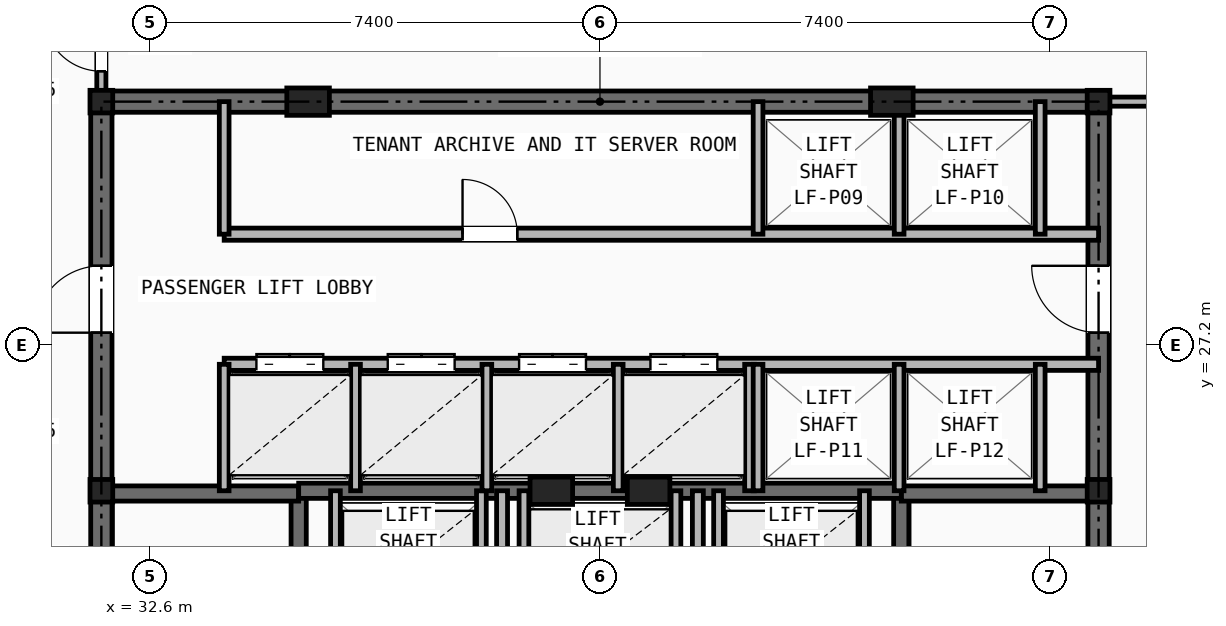
"""IFC4 building model, lengths in metres.
Left out: names, types, materials, properties, quantities, classifications, styles, units other than length and angle.
Written with IfcOpenShell. Run it as: python <this file> out.ifc"""

import sys

from ifc_helpers import new_model, si_unit, direction, frame, frame_2d, origin, origin_2d, place, context, subcontext, project, spatial, rectangle, i_section, extrude, element, fill, save


model = new_model("IFC4")
c1 = context("Model", 3, precision=1e-05, world=origin(), true_north=direction((0.0, 1.0)))
c2 = subcontext(c1, "Body", "Model", "MODEL_VIEW")
j1 = project(units=[si_unit("LENGTHUNIT", "METRE"), si_unit("PLANEANGLEUNIT", "RADIAN")], contexts=[c1])
p1 = place(None, origin())
s1 = spatial("IfcSite", under=j1, at=p1, CompositionType="ELEMENT")
p2 = place(p1, origin())
s2 = spatial("IfcBuilding", under=s1, at=p2, CompositionType="ELEMENT")
p3 = place(p2, frame((0.0, 0.0, 126.35)))
s3 = spatial("IfcBuildingStorey", under=s2, at=p3, CompositionType="ELEMENT", Elevation=126.35)
for number, where, z_axis, x_axis in (
    (1, (31.8, 24.8, 0.0), (0.0, 0.0, 1.0), (1.0, 0.0, 0.0)),
    (2, (48.2, 24.8, 0.0), (0.0, 0.0, 1.0), (1.0, 0.0, 0.0)),
    (3, (31.8, 31.2, 0.0), (0.0, 0.0, 1.0), (1.0, 0.0, 0.0)),
    (4, (48.2, 31.2, 0.0), (0.0, 0.0, 1.0), (1.0, 0.0, 0.0)),
):
    element("IfcColumn", number, at=place(p3, frame(where, z_axis=z_axis, x_axis=x_axis)), inside=s3, PredefinedType="COLUMN", context=c2, shape_type="SweptSolid", body=[
        extrude(i_section(OverallWidth=0.374, OverallDepth=0.372, WebThickness=0.016, FlangeThickness=0.026, at=origin_2d()), origin(), (0.0, 0.0, 1.0), 3.45),
    ])
for number, where, z_axis, x_axis in (
    (5, (35.2, 31.2, 0.0), (0.0, 0.0, 1.0), (1.0, 0.0, 0.0)),
    (6, (44.8, 31.2, 0.0), (0.0, 0.0, 1.0), (1.0, 0.0, 0.0)),
    (7, (39.2, 24.8, 0.0), (0.0, 0.0, 1.0), (1.0, 0.0, 0.0)),
    (8, (40.8, 24.8, 0.0), (0.0, 0.0, 1.0), (1.0, 0.0, 0.0)),
):
    element("IfcColumn", number, at=place(p3, frame(where, z_axis=z_axis, x_axis=x_axis)), inside=s3, PredefinedType="PILASTER", context=c2, shape_type="SweptSolid", body=[
        extrude(rectangle(XDim=0.7, YDim=0.45, at=origin_2d()), origin(), (0.0, 0.0, 1.0), 3.45),
    ])
p4 = place(p3, frame((31.8, 31.2, 0.0), z_axis=(0.0, 0.0, 1.0), x_axis=(1.0, 0.0, 0.0)))
e9 = element("IfcWall", 9, at=p4, inside=s3, PredefinedType="SHEAR", context=c2, shape_type="SweptSolid", body=[
    extrude(rectangle(XDim=16.4, YDim=0.35, at=frame_2d((8.2, 0.0))), origin(), (0.0, 0.0, 1.0), 3.21),
])
p5 = place(p3, frame((31.8, 16.4, 0.0), z_axis=(0.0, 0.0, 1.0), x_axis=(0.0, 1.0, 0.0)))
e10 = element("IfcWall", 10, at=p5, inside=s3, PredefinedType="SHEAR", context=c2, shape_type="SweptSolid", body=[
    extrude(rectangle(XDim=14.8, YDim=0.35, at=frame_2d((7.4, 0.0))), origin(), (0.0, 0.0, 1.0), 3.21),
])
p6 = place(p5, frame((11.0, 0.0, 0.0)))
e11 = element("IfcOpeningElement", 11, at=p6, cuts=e10, PredefinedType="OPENING", context=c2, shape_type="SweptSolid", body=[
    extrude(rectangle(XDim=1.1, YDim=2.15, at=frame_2d((0.55, 1.075))), frame((0.0, 0.185, 0.0), z_axis=(0.0, -1.0, 0.0), x_axis=(1.0, 0.0, 0.0)), (0.0, 0.0, 1.0), 0.37),
])
p7 = place(p3, frame((48.2, 16.4, 0.0), z_axis=(0.0, 0.0, 1.0), x_axis=(0.0, 1.0, 0.0)))
e12 = element("IfcWall", 12, at=p7, inside=s3, PredefinedType="SHEAR", context=c2, shape_type="SweptSolid", body=[
    extrude(rectangle(XDim=14.8, YDim=0.35, at=frame_2d((7.4, 0.0))), origin(), (0.0, 0.0, 1.0), 3.21),
])
p8 = place(p7, frame((11.0, 0.0, 0.0)))
e13 = element("IfcOpeningElement", 13, at=p8, cuts=e12, PredefinedType="OPENING", context=c2, shape_type="SweptSolid", body=[
    extrude(rectangle(XDim=1.1, YDim=2.15, at=frame_2d((0.55, 1.075))), frame((0.0, 0.185, 0.0), z_axis=(0.0, -1.0, 0.0), x_axis=(1.0, 0.0, 0.0)), (0.0, 0.0, 1.0), 0.37),
])
p9 = place(p3, frame((35.045, 16.4, 0.0), z_axis=(0.0, 0.0, 1.0), x_axis=(0.0, 1.0, 0.0)))
e14 = element("IfcWall", 14, at=p9, inside=s3, PredefinedType="SHEAR", context=c2, shape_type="SweptSolid", body=[
    extrude(rectangle(XDim=8.4, YDim=0.25, at=frame_2d((4.2, 0.0))), origin(), (0.0, 0.0, 1.0), 3.21),
])
p10 = place(p9, frame((0.45, 0.0, 0.0)))
e15 = element("IfcOpeningElement", 15, at=p10, cuts=e14, PredefinedType="OPENING", context=c2, shape_type="SweptSolid", body=[
    extrude(rectangle(XDim=0.95, YDim=2.1, at=frame_2d((0.475, 1.05))), frame((0.0, 0.135, 0.0), z_axis=(0.0, -1.0, 0.0), x_axis=(1.0, 0.0, 0.0)), (0.0, 0.0, 1.0), 0.27),
])
p11 = place(p3, frame((31.8, 24.755, 0.0), z_axis=(0.0, 0.0, 1.0), x_axis=(1.0, 0.0, 0.0)))
e16 = element("IfcWall", 16, at=p11, inside=s3, PredefinedType="SHEAR", context=c2, shape_type="SweptSolid", body=[
    extrude(rectangle(XDim=3.245, YDim=0.25, at=frame_2d((1.623, 0.0))), origin(), (0.0, 0.0, 1.0), 3.21),
])
p12 = place(p3, frame((44.955, 16.4, 0.0), z_axis=(0.0, 0.0, 1.0), x_axis=(0.0, 1.0, 0.0)))
e17 = element("IfcWall", 17, at=p12, inside=s3, PredefinedType="SHEAR", context=c2, shape_type="SweptSolid", body=[
    extrude(rectangle(XDim=8.4, YDim=0.25, at=frame_2d((4.2, 0.0))), origin(), (0.0, 0.0, 1.0), 3.21),
])
p13 = place(p12, frame((0.45, 0.0, 0.0)))
e18 = element("IfcOpeningElement", 18, at=p13, cuts=e17, PredefinedType="OPENING", context=c2, shape_type="SweptSolid", body=[
    extrude(rectangle(XDim=0.95, YDim=2.1, at=frame_2d((0.475, 1.05))), frame((0.0, 0.135, 0.0), z_axis=(0.0, -1.0, 0.0), x_axis=(1.0, 0.0, 0.0)), (0.0, 0.0, 1.0), 0.27),
])
p14 = place(p3, frame((44.955, 24.755, 0.0), z_axis=(0.0, 0.0, 1.0), x_axis=(1.0, 0.0, 0.0)))
e19 = element("IfcWall", 19, at=p14, inside=s3, PredefinedType="SHEAR", context=c2, shape_type="SweptSolid", body=[
    extrude(rectangle(XDim=3.245, YDim=0.25, at=frame_2d((1.623, 0.0))), origin(), (0.0, 0.0, 1.0), 3.21),
])
p15 = place(p3, frame((35.045, 24.8, 0.0), z_axis=(0.0, 0.0, 1.0), x_axis=(1.0, 0.0, 0.0)))
e20 = element("IfcWall", 20, at=p15, inside=s3, PredefinedType="SHEAR", context=c2, shape_type="SweptSolid", body=[
    extrude(rectangle(XDim=9.91, YDim=0.25, at=frame_2d((4.955, 0.0))), origin(), (0.0, 0.0, 1.0), 3.21),
])
p16 = place(p3, frame((38.39, 16.4, 0.0), z_axis=(0.0, 0.0, 1.0), x_axis=(0.0, 1.0, 0.0)))
e21 = element("IfcWall", 21, at=p16, inside=s3, PredefinedType="PARTITIONING", context=c2, shape_type="SweptSolid", body=[
    extrude(rectangle(XDim=8.4, YDim=0.18, at=frame_2d((4.2, 0.0))), origin(), (0.0, 0.0, 1.0), 2.661),
])
p17 = place(p16, frame((1.8, 0.0, 0.0)))
e22 = element("IfcOpeningElement", 22, at=p17, cuts=e21, PredefinedType="OPENING", context=c2, shape_type="SweptSolid", body=[
    extrude(rectangle(XDim=0.85, YDim=2.05, at=frame_2d((0.425, 1.025))), frame((0.0, 0.1, 0.0), z_axis=(0.0, -1.0, 0.0), x_axis=(1.0, 0.0, 0.0)), (0.0, 0.0, 1.0), 0.2),
])
p18 = place(p16, frame((4.35, 0.0, 0.0)))
e23 = element("IfcOpeningElement", 23, at=p18, cuts=e21, PredefinedType="OPENING", context=c2, shape_type="SweptSolid", body=[
    extrude(rectangle(XDim=0.95, YDim=2.1, at=frame_2d((0.475, 1.05))), frame((0.0, 0.1, 0.0), z_axis=(0.0, -1.0, 0.0), x_axis=(1.0, 0.0, 0.0)), (0.0, 0.0, 1.0), 0.2),
])
p19 = place(p3, frame((41.61, 16.4, 0.0), z_axis=(0.0, 0.0, 1.0), x_axis=(0.0, 1.0, 0.0)))
e24 = element("IfcWall", 24, at=p19, inside=s3, PredefinedType="PARTITIONING", context=c2, shape_type="SweptSolid", body=[
    extrude(rectangle(XDim=8.4, YDim=0.18, at=frame_2d((4.2, 0.0))), origin(), (0.0, 0.0, 1.0), 2.661),
])
p20 = place(p19, frame((1.8, 0.0, 0.0)))
e25 = element("IfcOpeningElement", 25, at=p20, cuts=e24, PredefinedType="OPENING", context=c2, shape_type="SweptSolid", body=[
    extrude(rectangle(XDim=0.85, YDim=2.05, at=frame_2d((0.425, 1.025))), frame((0.0, 0.1, 0.0), z_axis=(0.0, -1.0, 0.0), x_axis=(1.0, 0.0, 0.0)), (0.0, 0.0, 1.0), 0.2),
])
for number, where, z_axis, x_axis in (
    (26, (35.65, 22.48, 0.0), (0.0, 0.0, 1.0), (0.0, 1.0, 0.0)),
    (27, (38.05, 22.48, 0.0), (0.0, 0.0, 1.0), (0.0, 1.0, 0.0)),
    (28, (41.95, 22.48, 0.0), (0.0, 0.0, 1.0), (0.0, 1.0, 0.0)),
    (29, (44.35, 22.48, 0.0), (0.0, 0.0, 1.0), (0.0, 1.0, 0.0)),
    (30, (38.75, 22.48, 0.0), (0.0, 0.0, 1.0), (0.0, 1.0, 0.0)),
    (31, (41.25, 22.48, 0.0), (0.0, 0.0, 1.0), (0.0, 1.0, 0.0)),
):
    element("IfcWall", number, at=place(p3, frame(where, z_axis=z_axis, x_axis=x_axis)), inside=s3, PredefinedType="SOLIDWALL", context=c2, shape_type="SweptSolid", body=[
        extrude(rectangle(XDim=2.32, YDim=0.16, at=frame_2d((1.16, 0.0))), origin(), (0.0, 0.0, 1.0), 3.21),
    ])
p21 = place(p3, frame((33.82, 29.02, 0.0), z_axis=(0.0, 0.0, 1.0), x_axis=(1.0, 0.0, 0.0)))
e32 = element("IfcWall", 32, at=p21, inside=s3, PredefinedType="SOLIDWALL", context=c2, shape_type="SweptSolid", body=[
    extrude(rectangle(XDim=14.38, YDim=0.2, at=frame_2d((7.19, 0.0))), origin(), (0.0, 0.0, 1.0), 2.661),
])
p22 = place(p21, frame((3.92, 0.0, 0.0)))
e33 = element("IfcOpeningElement", 33, at=p22, cuts=e32, PredefinedType="OPENING", context=c2, shape_type="SweptSolid", body=[
    extrude(rectangle(XDim=0.9, YDim=2.1, at=frame_2d((0.45, 1.05))), frame((0.0, 0.11, 0.0), z_axis=(0.0, -1.0, 0.0), x_axis=(1.0, 0.0, 0.0)), (0.0, 0.0, 1.0), 0.22),
])
p23 = place(p3, frame((33.82, 26.88, 0.0), z_axis=(0.0, 0.0, 1.0), x_axis=(1.0, 0.0, 0.0)))
e34 = element("IfcWall", 34, at=p23, inside=s3, PredefinedType="SOLIDWALL", context=c2, shape_type="SweptSolid", body=[
    extrude(rectangle(XDim=14.38, YDim=0.2, at=frame_2d((7.19, 0.0))), origin(), (0.0, 0.0, 1.0), 2.661),
])
p24 = place(p23, frame((0.53, 0.0, 0.0)))
e35 = element("IfcOpeningElement", 35, at=p24, cuts=e34, PredefinedType="OPENING", context=c2, shape_type="SweptSolid", body=[
    extrude(rectangle(XDim=1.1, YDim=2.15, at=frame_2d((0.55, 1.075))), frame((0.0, 0.11, 0.0), z_axis=(0.0, -1.0, 0.0), x_axis=(1.0, 0.0, 0.0)), (0.0, 0.0, 1.0), 0.22),
])
p25 = place(p23, frame((2.69, 0.0, 0.0)))
e36 = element("IfcOpeningElement", 36, at=p25, cuts=e34, PredefinedType="OPENING", context=c2, shape_type="SweptSolid", body=[
    extrude(rectangle(XDim=1.1, YDim=2.15, at=frame_2d((0.55, 1.075))), frame((0.0, 0.11, 0.0), z_axis=(0.0, -1.0, 0.0), x_axis=(1.0, 0.0, 0.0)), (0.0, 0.0, 1.0), 0.22),
])
p26 = place(p23, frame((4.85, 0.0, 0.0)))
e37 = element("IfcOpeningElement", 37, at=p26, cuts=e34, PredefinedType="OPENING", context=c2, shape_type="SweptSolid", body=[
    extrude(rectangle(XDim=1.1, YDim=2.15, at=frame_2d((0.55, 1.075))), frame((0.0, 0.11, 0.0), z_axis=(0.0, -1.0, 0.0), x_axis=(1.0, 0.0, 0.0)), (0.0, 0.0, 1.0), 0.22),
])
p27 = place(p23, frame((7.01, 0.0, 0.0)))
e38 = element("IfcOpeningElement", 38, at=p27, cuts=e34, PredefinedType="OPENING", context=c2, shape_type="SweptSolid", body=[
    extrude(rectangle(XDim=1.1, YDim=2.15, at=frame_2d((0.55, 1.075))), frame((0.0, 0.11, 0.0), z_axis=(0.0, -1.0, 0.0), x_axis=(1.0, 0.0, 0.0)), (0.0, 0.0, 1.0), 0.22),
])
p28 = place(p3, frame((33.82, 29.02, 0.0), z_axis=(0.0, 0.0, 1.0), x_axis=(0.0, 1.0, 0.0)))
e39 = element("IfcWall", 39, at=p28, inside=s3, PredefinedType="SOLIDWALL", context=c2, shape_type="SweptSolid", body=[
    extrude(rectangle(XDim=2.18, YDim=0.16, at=frame_2d((1.09, 0.0))), origin(), (0.0, 0.0, 1.0), 2.661),
])
for number, where, z_axis, x_axis in (
    (40, (33.82, 24.8, 0.0), (0.0, 0.0, 1.0), (0.0, 1.0, 0.0)),
    (41, (35.98, 24.8, 0.0), (0.0, 0.0, 1.0), (0.0, 1.0, 0.0)),
    (42, (38.14, 24.8, 0.0), (0.0, 0.0, 1.0), (0.0, 1.0, 0.0)),
    (43, (40.3, 24.8, 0.0), (0.0, 0.0, 1.0), (0.0, 1.0, 0.0)),
    (44, (42.46, 24.8, 0.0), (0.0, 0.0, 1.0), (0.0, 1.0, 0.0)),
):
    element("IfcWall", number, at=place(p3, frame(where, z_axis=z_axis, x_axis=x_axis)), inside=s3, PredefinedType="SOLIDWALL", context=c2, shape_type="SweptSolid", body=[
        extrude(rectangle(XDim=2.08, YDim=0.16, at=frame_2d((1.04, 0.0))), origin(), (0.0, 0.0, 1.0), 3.21),
    ])
for number, where, z_axis, x_axis in (
    (45, (42.6, 29.02, 0.0), (0.0, 0.0, 1.0), (0.0, 1.0, 0.0)),
    (46, (44.92, 29.02, 0.0), (0.0, 0.0, 1.0), (0.0, 1.0, 0.0)),
    (47, (47.24, 29.02, 0.0), (0.0, 0.0, 1.0), (0.0, 1.0, 0.0)),
):
    element("IfcWall", number, at=place(p3, frame(where, z_axis=z_axis, x_axis=x_axis)), inside=s3, PredefinedType="SOLIDWALL", context=c2, shape_type="SweptSolid", body=[
        extrude(rectangle(XDim=2.18, YDim=0.16, at=frame_2d((1.09, 0.0))), origin(), (0.0, 0.0, 1.0), 2.661),
    ])
for number, where, z_axis, x_axis in (
    (48, (42.6, 24.8, 0.0), (0.0, 0.0, 1.0), (0.0, 1.0, 0.0)),
    (49, (44.92, 24.8, 0.0), (0.0, 0.0, 1.0), (0.0, 1.0, 0.0)),
    (50, (47.24, 24.8, 0.0), (0.0, 0.0, 1.0), (0.0, 1.0, 0.0)),
):
    element("IfcWall", number, at=place(p3, frame(where, z_axis=z_axis, x_axis=x_axis)), inside=s3, PredefinedType="SOLIDWALL", context=c2, shape_type="SweptSolid", body=[
        extrude(rectangle(XDim=2.08, YDim=0.16, at=frame_2d((1.04, 0.0))), origin(), (0.0, 0.0, 1.0), 3.21),
    ])
p29 = place(p3, frame((31.8, 31.2, 0.0), z_axis=(0.0, 0.0, 1.0), x_axis=(0.0, 1.0, 0.0)))
e51 = element("IfcWall", 51, at=p29, inside=s3, PredefinedType="PARTITIONING", context=c2, shape_type="SweptSolid", body=[
    extrude(rectangle(XDim=5.3, YDim=0.15, at=frame_2d((2.65, 0.0))), origin(), (0.0, 0.0, 1.0), 2.225),
])
p30 = place(p29, frame((0.5, 0.0, 0.0)))
e52 = element("IfcOpeningElement", 52, at=p30, cuts=e51, PredefinedType="OPENING", context=c2, shape_type="SweptSolid", body=[
    extrude(rectangle(XDim=0.95, YDim=2.1, at=frame_2d((0.475, 1.05))), frame((0.0, 0.085, 0.0), z_axis=(0.0, -1.0, 0.0), x_axis=(1.0, 0.0, 0.0)), (0.0, 0.0, 1.0), 0.17),
])
p31 = place(p29, frame((4.23, 0.0, 0.0)))
e53 = element("IfcOpeningElement", 53, at=p31, cuts=e51, PredefinedType="OPENING", context=c2, shape_type="SweptSolid", body=[
    extrude(rectangle(XDim=0.95, YDim=2.1, at=frame_2d((0.475, 1.05))), frame((0.0, 0.085, 0.0), z_axis=(0.0, -1.0, 0.0), x_axis=(1.0, 0.0, 0.0)), (0.0, 0.0, 1.0), 0.17),
])
p32 = place(p3, frame((48.2, 31.2, 0.0), z_axis=(0.0, 0.0, 1.0), x_axis=(1.0, 0.0, 0.0)))
e54 = element("IfcWall", 54, at=p32, inside=s3, PredefinedType="PARTITIONING", context=c2, shape_type="SweptSolid", body=[
    extrude(rectangle(XDim=8.972, YDim=0.15, at=frame_2d((4.486, 0.0))), origin(), (0.0, 0.0, 1.0), 2.225),
])
p33 = place(p6, origin())
e55 = element("IfcDoor", 55, at=p33, inside=s3, OperationType="SINGLE_SWING_LEFT", PredefinedType="DOOR", context=c2, shape_type="SweptSolid", body=[
    extrude(rectangle(XDim=1.1, YDim=2.15, at=frame_2d((0.55, 1.075))), frame((0.0, 0.025, 0.0), z_axis=(0.0, -1.0, 0.0), x_axis=(1.0, 0.0, 0.0)), (0.0, 0.0, 1.0), 0.05),
])
fill(e11, e55)
p34 = place(p8, origin())
e56 = element("IfcDoor", 56, at=p34, inside=s3, OperationType="SINGLE_SWING_RIGHT", PredefinedType="DOOR", context=c2, shape_type="SweptSolid", body=[
    extrude(rectangle(XDim=1.1, YDim=2.15, at=frame_2d((0.55, 1.075))), frame((0.0, 0.025, 0.0), z_axis=(0.0, -1.0, 0.0), x_axis=(1.0, 0.0, 0.0)), (0.0, 0.0, 1.0), 0.05),
])
fill(e13, e56)
p35 = place(p22, origin())
e57 = element("IfcDoor", 57, at=p35, inside=s3, OperationType="SINGLE_SWING_LEFT", PredefinedType="DOOR", context=c2, shape_type="SweptSolid", body=[
    extrude(rectangle(XDim=0.9, YDim=2.1, at=frame_2d((0.45, 1.05))), frame((0.0, 0.025, 0.0), z_axis=(0.0, -1.0, 0.0), x_axis=(1.0, 0.0, 0.0)), (0.0, 0.0, 1.0), 0.05),
])
fill(e33, e57)
p36 = place(p24, origin())
e58 = element("IfcDoor", 58, at=p36, inside=s3, OperationType="DOUBLE_DOOR_SLIDING", PredefinedType="DOOR", context=c2, shape_type="SweptSolid", body=[
    extrude(rectangle(XDim=1.1, YDim=2.15, at=frame_2d((0.55, 1.075))), frame((0.0, 0.025, 0.0), z_axis=(0.0, -1.0, 0.0), x_axis=(1.0, 0.0, 0.0)), (0.0, 0.0, 1.0), 0.05),
])
fill(e35, e58)
p37 = place(p25, origin())
e59 = element("IfcDoor", 59, at=p37, inside=s3, OperationType="DOUBLE_DOOR_SLIDING", PredefinedType="DOOR", context=c2, shape_type="SweptSolid", body=[
    extrude(rectangle(XDim=1.1, YDim=2.15, at=frame_2d((0.55, 1.075))), frame((0.0, 0.025, 0.0), z_axis=(0.0, -1.0, 0.0), x_axis=(1.0, 0.0, 0.0)), (0.0, 0.0, 1.0), 0.05),
])
fill(e36, e59)
p38 = place(p26, origin())
e60 = element("IfcDoor", 60, at=p38, inside=s3, OperationType="DOUBLE_DOOR_SLIDING", PredefinedType="DOOR", context=c2, shape_type="SweptSolid", body=[
    extrude(rectangle(XDim=1.1, YDim=2.15, at=frame_2d((0.55, 1.075))), frame((0.0, 0.025, 0.0), z_axis=(0.0, -1.0, 0.0), x_axis=(1.0, 0.0, 0.0)), (0.0, 0.0, 1.0), 0.05),
])
fill(e37, e60)
p39 = place(p27, origin())
e61 = element("IfcDoor", 61, at=p39, inside=s3, OperationType="DOUBLE_DOOR_SLIDING", PredefinedType="DOOR", context=c2, shape_type="SweptSolid", body=[
    extrude(rectangle(XDim=1.1, YDim=2.15, at=frame_2d((0.55, 1.075))), frame((0.0, 0.025, 0.0), z_axis=(0.0, -1.0, 0.0), x_axis=(1.0, 0.0, 0.0)), (0.0, 0.0, 1.0), 0.05),
])
fill(e38, e61)
p40 = place(p30, origin())
e62 = element("IfcDoor", 62, at=p40, inside=s3, OperationType="SINGLE_SWING_RIGHT", PredefinedType="DOOR", context=c2, shape_type="SweptSolid", body=[
    extrude(rectangle(XDim=0.95, YDim=2.1, at=frame_2d((0.475, 1.05))), frame((0.0, 0.025, 0.0), z_axis=(0.0, -1.0, 0.0), x_axis=(1.0, 0.0, 0.0)), (0.0, 0.0, 1.0), 0.05),
])
fill(e52, e62)
save(model, sys.argv[1])
